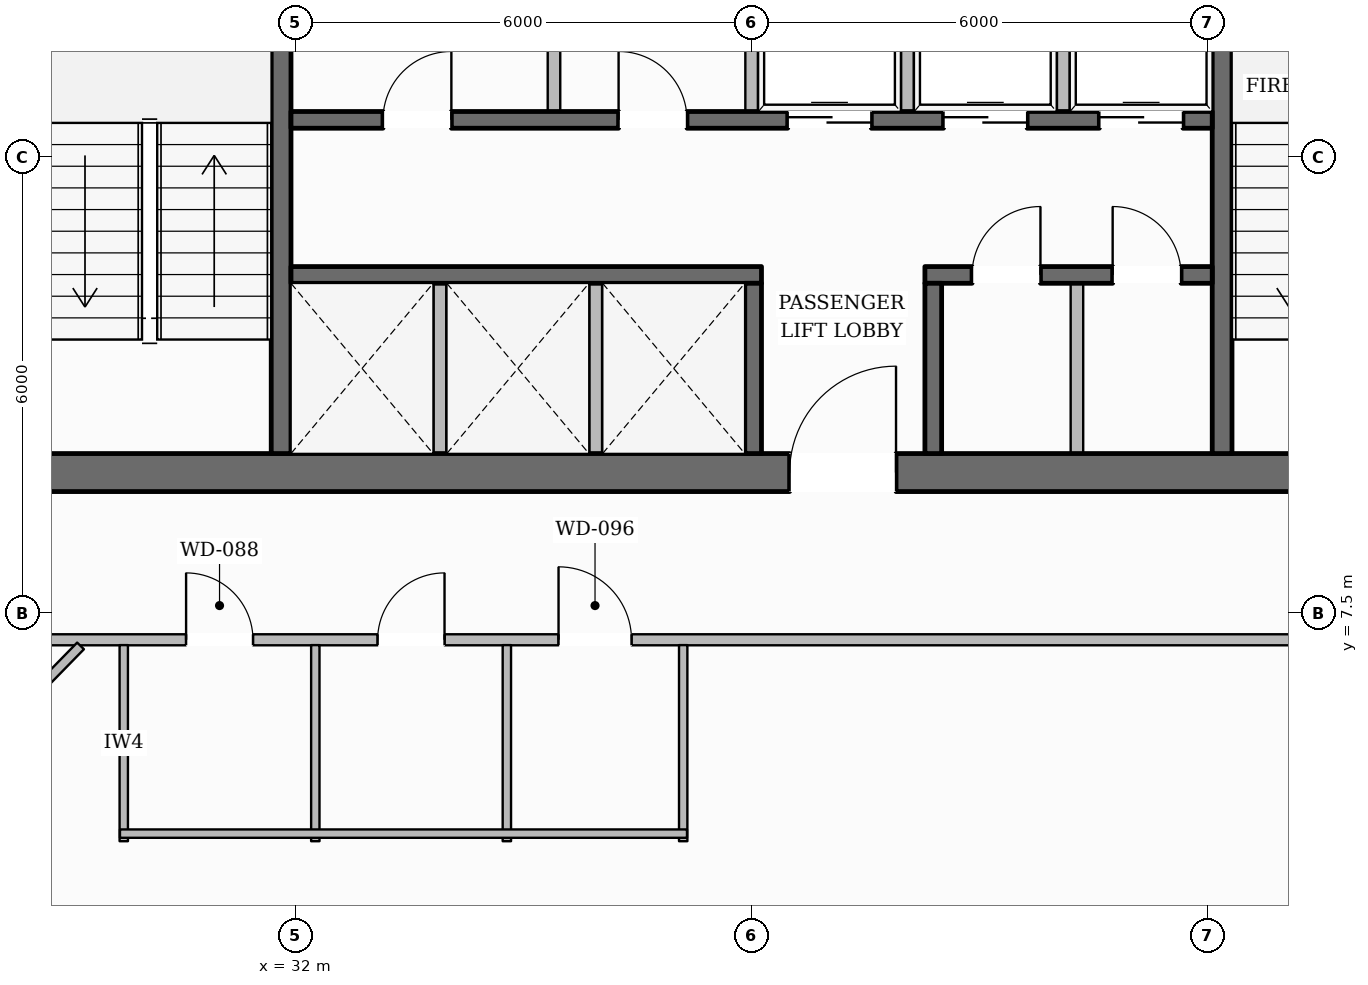
"""IFC4 building model, lengths in metres.
Left out: names, types, materials, properties, quantities, classifications, styles, units other than length and angle.
Written with IfcOpenShell. Run it as: python <this file> out.ifc"""

import sys

from ifc_helpers import new_model, si_unit, direction, frame, frame_2d, origin, place, context, subcontext, project, spatial, rectangle, extrude, element, fill, save


model = new_model("IFC4")
c1 = context("Model", 3, precision=1e-05, world=origin(), true_north=direction((0.0, 1.0)))
c2 = subcontext(c1, "Body", "Model", "MODEL_VIEW")
j1 = project(units=[si_unit("LENGTHUNIT", "METRE"), si_unit("PLANEANGLEUNIT", "RADIAN")], contexts=[c1])
p1 = place(None, origin())
s1 = spatial("IfcSite", under=j1, at=p1, CompositionType="ELEMENT")
p2 = place(p1, origin())
s2 = spatial("IfcBuilding", under=s1, at=p2, CompositionType="ELEMENT")
p3 = place(p2, frame((0.0, 0.0, 147.1)))
s3 = spatial("IfcBuildingStorey", under=s2, at=p3, CompositionType="ELEMENT", Elevation=147.1)
p4 = place(p3, frame((27.98, 9.35, 0.0), z_axis=(0.0, 0.0, 1.0), x_axis=(1.0, 0.0, 0.0)))
e1 = element("IfcWall", 1, at=p4, inside=s3, PredefinedType="SOLIDWALL", context=c2, shape_type="SweptSolid", body=[
    extrude(rectangle(XDim=20.04, YDim=0.5, at=frame_2d((10.02, 0.0))), origin(), (0.0, 0.0, 1.0), 3.6),
])
p5 = place(p4, frame((10.52, 0.0, 0.0)))
e2 = element("IfcOpeningElement", 2, at=p5, cuts=e1, PredefinedType="OPENING", context=c2, shape_type="SweptSolid", body=[
    extrude(rectangle(XDim=1.4, YDim=2.2, at=frame_2d((0.7, 1.1))), frame((0.0, 0.26, 0.0), z_axis=(0.0, -1.0, 0.0), x_axis=(1.0, 0.0, 0.0)), (0.0, 0.0, 1.0), 0.52),
])
p6 = place(p3, frame((31.81, 9.6, 0.0), z_axis=(0.0, 0.0, 1.0), x_axis=(0.0, 1.0, 0.0)))
e3 = element("IfcWall", 3, at=p6, inside=s3, PredefinedType="SHEAR", context=c2, shape_type="SweptSolid", body=[
    extrude(rectangle(XDim=13.0, YDim=0.26, at=frame_2d((6.5, 0.0))), origin(), (0.0, 0.0, 1.0), 3.6),
])
p7 = place(p6, frame((10.925, 0.0, 0.0)))
e4 = element("IfcOpeningElement", 4, at=p7, cuts=e3, PredefinedType="OPENING", context=c2, shape_type="SweptSolid", body=[
    extrude(rectangle(XDim=1.25, YDim=2.25, at=frame_2d((0.625, 1.125))), frame((0.0, 0.14, 0.0), z_axis=(0.0, -1.0, 0.0), x_axis=(1.0, 0.0, 0.0)), (0.0, 0.0, 1.0), 0.28),
])
p8 = place(p3, frame((44.19, 9.6, 0.0), z_axis=(0.0, 0.0, 1.0), x_axis=(0.0, 1.0, 0.0)))
e5 = element("IfcWall", 5, at=p8, inside=s3, PredefinedType="SHEAR", context=c2, shape_type="SweptSolid", body=[
    extrude(rectangle(XDim=13.0, YDim=0.26, at=frame_2d((6.5, 0.0))), origin(), (0.0, 0.0, 1.0), 3.6),
])
p9 = place(p8, frame((10.925, 0.0, 0.0)))
e6 = element("IfcOpeningElement", 6, at=p9, cuts=e5, PredefinedType="OPENING", context=c2, shape_type="SweptSolid", body=[
    extrude(rectangle(XDim=1.25, YDim=2.25, at=frame_2d((0.625, 1.125))), frame((0.0, 0.14, 0.0), z_axis=(0.0, -1.0, 0.0), x_axis=(1.0, 0.0, 0.0)), (0.0, 0.0, 1.0), 0.28),
])
p10 = place(p3, frame((31.94, 13.99, 0.0), z_axis=(0.0, 0.0, 1.0), x_axis=(1.0, 0.0, 0.0)))
e7 = element("IfcWall", 7, at=p10, inside=s3, PredefinedType="SOLIDWALL", context=c2, shape_type="SweptSolid", body=[
    extrude(rectangle(XDim=12.12, YDim=0.22, at=frame_2d((6.06, 0.0))), origin(), (0.0, 0.0, 1.0), 3.6),
])
p11 = place(p10, frame((1.21, 0.0, 0.0)))
e8 = element("IfcOpeningElement", 8, at=p11, cuts=e7, PredefinedType="OPENING", context=c2, shape_type="SweptSolid", body=[
    extrude(rectangle(XDim=0.9, YDim=2.1, at=frame_2d((0.45, 1.05))), frame((0.0, 0.12, 0.0), z_axis=(0.0, -1.0, 0.0), x_axis=(1.0, 0.0, 0.0)), (0.0, 0.0, 1.0), 0.24),
])
p12 = place(p10, frame((4.31, 0.0, 0.0)))
e9 = element("IfcOpeningElement", 9, at=p12, cuts=e7, PredefinedType="OPENING", context=c2, shape_type="SweptSolid", body=[
    extrude(rectangle(XDim=0.9, YDim=2.1, at=frame_2d((0.45, 1.05))), frame((0.0, 0.12, 0.0), z_axis=(0.0, -1.0, 0.0), x_axis=(1.0, 0.0, 0.0)), (0.0, 0.0, 1.0), 0.24),
])
p13 = place(p10, frame((6.535, 0.0, 0.0)))
e10 = element("IfcOpeningElement", 10, at=p13, cuts=e7, PredefinedType="OPENING", context=c2, shape_type="SweptSolid", body=[
    extrude(rectangle(XDim=1.1, YDim=2.2, at=frame_2d((0.55, 1.1))), frame((0.0, 0.12, 0.0), z_axis=(0.0, -1.0, 0.0), x_axis=(1.0, 0.0, 0.0)), (0.0, 0.0, 1.0), 0.24),
])
p14 = place(p10, frame((8.585, 0.0, 0.0)))
e11 = element("IfcOpeningElement", 11, at=p14, cuts=e7, PredefinedType="OPENING", context=c2, shape_type="SweptSolid", body=[
    extrude(rectangle(XDim=1.1, YDim=2.2, at=frame_2d((0.55, 1.1))), frame((0.0, 0.12, 0.0), z_axis=(0.0, -1.0, 0.0), x_axis=(1.0, 0.0, 0.0)), (0.0, 0.0, 1.0), 0.24),
])
p15 = place(p10, frame((10.635, 0.0, 0.0)))
e12 = element("IfcOpeningElement", 12, at=p15, cuts=e7, PredefinedType="OPENING", context=c2, shape_type="SweptSolid", body=[
    extrude(rectangle(XDim=1.1, YDim=2.2, at=frame_2d((0.55, 1.1))), frame((0.0, 0.12, 0.0), z_axis=(0.0, -1.0, 0.0), x_axis=(1.0, 0.0, 0.0)), (0.0, 0.0, 1.0), 0.24),
])
p16 = place(p3, frame((31.94, 11.95, 0.0), z_axis=(0.0, 0.0, 1.0), x_axis=(1.0, 0.0, 0.0)))
e13 = element("IfcWall", 13, at=p16, inside=s3, PredefinedType="SOLIDWALL", context=c2, shape_type="SweptSolid", body=[
    extrude(rectangle(XDim=6.19, YDim=0.22, at=frame_2d((3.095, 0.0))), origin(), (0.0, 0.0, 1.0), 3.6),
])
p17 = place(p3, frame((40.28, 11.95, 0.0), z_axis=(0.0, 0.0, 1.0), x_axis=(1.0, 0.0, 0.0)))
e14 = element("IfcWall", 14, at=p17, inside=s3, PredefinedType="SOLIDWALL", context=c2, shape_type="SweptSolid", body=[
    extrude(rectangle(XDim=3.78, YDim=0.22, at=frame_2d((1.89, 0.0))), origin(), (0.0, 0.0, 1.0), 3.6),
])
p18 = place(p17, frame((0.62, 0.0, 0.0)))
e15 = element("IfcOpeningElement", 15, at=p18, cuts=e14, PredefinedType="OPENING", context=c2, shape_type="SweptSolid", body=[
    extrude(rectangle(XDim=0.9, YDim=2.1, at=frame_2d((0.45, 1.05))), frame((0.0, 0.12, 0.0), z_axis=(0.0, -1.0, 0.0), x_axis=(1.0, 0.0, 0.0)), (0.0, 0.0, 1.0), 0.24),
])
p19 = place(p17, frame((2.47, 0.0, 0.0)))
e16 = element("IfcOpeningElement", 16, at=p19, cuts=e14, PredefinedType="OPENING", context=c2, shape_type="SweptSolid", body=[
    extrude(rectangle(XDim=0.9, YDim=2.1, at=frame_2d((0.45, 1.05))), frame((0.0, 0.12, 0.0), z_axis=(0.0, -1.0, 0.0), x_axis=(1.0, 0.0, 0.0)), (0.0, 0.0, 1.0), 0.24),
])
for number, where, z_axis, x_axis in (
    (17, (38.02, 9.6, 0.0), (0.0, 0.0, 1.0), (0.0, 1.0, 0.0)),
    (18, (40.39, 9.6, 0.0), (0.0, 0.0, 1.0), (0.0, 1.0, 0.0)),
):
    element("IfcWall", number, at=place(p3, frame(where, z_axis=z_axis, x_axis=x_axis)), inside=s3, PredefinedType="SOLIDWALL", context=c2, shape_type="SweptSolid", body=[
        extrude(rectangle(XDim=2.24, YDim=0.22, at=frame_2d((1.12, 0.0))), origin(), (0.0, 0.0, 1.0), 3.6),
    ])
p20 = place(p3, frame((13.248, 11.879, 0.0), z_axis=(0.0, 0.0, 1.0), x_axis=(0.503467320033, 0.864014269361, 0.0)))
e19 = element("IfcWall", 19, at=p20, inside=s3, PredefinedType="STANDARD", context=c2, shape_type="SweptSolid", body=[
    extrude(rectangle(XDim=38.396, YDim=0.38, at=frame_2d((19.198, 0.0))), origin(), (0.0, 0.0, 1.0), 3.059),
])
p21 = place(p20, frame((34.027, 0.0, 0.65)))
e20 = element("IfcOpeningElement", 20, at=p21, cuts=e19, PredefinedType="OPENING", context=c2, shape_type="SweptSolid", body=[
    extrude(rectangle(XDim=1.55, YDim=1.75, at=frame_2d((0.775, 0.875))), frame((0.0, 0.2, 0.0), z_axis=(0.0, -1.0, 0.0), x_axis=(1.0, 0.0, 0.0)), (0.0, 0.0, 1.0), 0.4),
])
p22 = place(p20, frame((27.786, 0.0, 0.65)))
e21 = element("IfcOpeningElement", 21, at=p22, cuts=e19, PredefinedType="OPENING", context=c2, shape_type="SweptSolid", body=[
    extrude(rectangle(XDim=1.55, YDim=1.75, at=frame_2d((0.775, 0.875))), frame((0.0, 0.2, 0.0), z_axis=(0.0, -1.0, 0.0), x_axis=(1.0, 0.0, 0.0)), (0.0, 0.0, 1.0), 0.4),
])
p23 = place(p20, frame((15.304, 0.0, 0.65)))
e22 = element("IfcOpeningElement", 22, at=p23, cuts=e19, PredefinedType="OPENING", context=c2, shape_type="SweptSolid", body=[
    extrude(rectangle(XDim=1.55, YDim=1.75, at=frame_2d((0.775, 0.875))), frame((0.0, 0.2, 0.0), z_axis=(0.0, -1.0, 0.0), x_axis=(1.0, 0.0, 0.0)), (0.0, 0.0, 1.0), 0.4),
])
p24 = place(p20, frame((9.063, 0.0, 0.65)))
e23 = element("IfcOpeningElement", 23, at=p24, cuts=e19, PredefinedType="OPENING", context=c2, shape_type="SweptSolid", body=[
    extrude(rectangle(XDim=1.55, YDim=1.75, at=frame_2d((0.775, 0.875))), frame((0.0, 0.2, 0.0), z_axis=(0.0, -1.0, 0.0), x_axis=(1.0, 0.0, 0.0)), (0.0, 0.0, 1.0), 0.4),
])
p25 = place(p20, frame((2.823, 0.0, 0.65)))
e24 = element("IfcOpeningElement", 24, at=p25, cuts=e19, PredefinedType="OPENING", context=c2, shape_type="SweptSolid", body=[
    extrude(rectangle(XDim=1.55, YDim=1.75, at=frame_2d((0.775, 0.875))), frame((0.0, 0.2, 0.0), z_axis=(0.0, -1.0, 0.0), x_axis=(1.0, 0.0, 0.0)), (0.0, 0.0, 1.0), 0.4),
])
p26 = place(p3, frame((43.264, 45.146, 0.0), z_axis=(0.0, 0.0, 1.0), x_axis=(0.496479799544, -0.868048275527, 0.0)))
e25 = element("IfcWall", 25, at=p26, inside=s3, PredefinedType="STANDARD", context=c2, shape_type="SweptSolid", body=[
    extrude(rectangle(XDim=37.869, YDim=0.38, at=frame_2d((18.934, 0.0))), origin(), (0.0, 0.0, 1.0), 3.059),
])
p27 = place(p26, frame((33.541, 0.0, 0.65)))
e26 = element("IfcOpeningElement", 26, at=p27, cuts=e25, PredefinedType="OPENING", context=c2, shape_type="SweptSolid", body=[
    extrude(rectangle(XDim=1.55, YDim=1.75, at=frame_2d((0.775, 0.875))), frame((0.0, 0.2, 0.0), z_axis=(0.0, -1.0, 0.0), x_axis=(1.0, 0.0, 0.0)), (0.0, 0.0, 1.0), 0.4),
])
p28 = place(p26, frame((27.389, 0.0, 0.65)))
e27 = element("IfcOpeningElement", 27, at=p28, cuts=e25, PredefinedType="OPENING", context=c2, shape_type="SweptSolid", body=[
    extrude(rectangle(XDim=1.55, YDim=1.75, at=frame_2d((0.775, 0.875))), frame((0.0, 0.2, 0.0), z_axis=(0.0, -1.0, 0.0), x_axis=(1.0, 0.0, 0.0)), (0.0, 0.0, 1.0), 0.4),
])
p29 = place(p26, frame((15.085, 0.0, 0.65)))
e28 = element("IfcOpeningElement", 28, at=p29, cuts=e25, PredefinedType="OPENING", context=c2, shape_type="SweptSolid", body=[
    extrude(rectangle(XDim=1.55, YDim=1.75, at=frame_2d((0.775, 0.875))), frame((0.0, 0.2, 0.0), z_axis=(0.0, -1.0, 0.0), x_axis=(1.0, 0.0, 0.0)), (0.0, 0.0, 1.0), 0.4),
])
p30 = place(p26, frame((8.934, 0.0, 0.65)))
e29 = element("IfcOpeningElement", 29, at=p30, cuts=e25, PredefinedType="OPENING", context=c2, shape_type="SweptSolid", body=[
    extrude(rectangle(XDim=1.55, YDim=1.75, at=frame_2d((0.775, 0.875))), frame((0.0, 0.2, 0.0), z_axis=(0.0, -1.0, 0.0), x_axis=(1.0, 0.0, 0.0)), (0.0, 0.0, 1.0), 0.4),
])
p31 = place(p26, frame((2.782, 0.0, 0.65)))
e30 = element("IfcOpeningElement", 30, at=p31, cuts=e25, PredefinedType="OPENING", context=c2, shape_type="SweptSolid", body=[
    extrude(rectangle(XDim=1.55, YDim=1.75, at=frame_2d((0.775, 0.875))), frame((0.0, 0.2, 0.0), z_axis=(0.0, -1.0, 0.0), x_axis=(1.0, 0.0, 0.0)), (0.0, 0.0, 1.0), 0.4),
])
for number, where, z_axis, x_axis in (
    (31, (33.9, 9.55, 0.0), (0.0, 0.0, 1.0), (0.0, 1.0, 0.0)),
    (32, (35.95, 9.55, 0.0), (0.0, 0.0, 1.0), (0.0, 1.0, 0.0)),
):
    element("IfcWall", number, at=place(p3, frame(where, z_axis=z_axis, x_axis=x_axis)), inside=s3, PredefinedType="PARTITIONING", context=c2, shape_type="SweptSolid", body=[
        extrude(rectangle(XDim=2.29, YDim=0.165, at=frame_2d((1.145, 0.0))), origin(), (0.0, 0.0, 1.0), 3.6),
    ])
for number, where, z_axis, x_axis in (
    (33, (38.0, 14.1, 0.0), (0.0, 0.0, 1.0), (0.0, 1.0, 0.0)),
    (34, (35.4, 14.1, 0.0), (0.0, 0.0, 1.0), (0.0, 1.0, 0.0)),
    (35, (40.05, 14.1, 0.0), (0.0, 0.0, 1.0), (0.0, 1.0, 0.0)),
    (36, (42.1, 14.1, 0.0), (0.0, 0.0, 1.0), (0.0, 1.0, 0.0)),
):
    element("IfcWall", number, at=place(p3, frame(where, z_axis=z_axis, x_axis=x_axis)), inside=s3, PredefinedType="PARTITIONING", context=c2, shape_type="SweptSolid", body=[
        extrude(rectangle(XDim=2.24, YDim=0.165, at=frame_2d((1.12, 0.0))), origin(), (0.0, 0.0, 1.0), 3.6),
    ])
p32 = place(p3, frame((42.28, 9.55, 0.0), z_axis=(0.0, 0.0, 1.0), x_axis=(0.0, 1.0, 0.0)))
e37 = element("IfcWall", 37, at=p32, inside=s3, PredefinedType="PARTITIONING", context=c2, shape_type="SweptSolid", body=[
    extrude(rectangle(XDim=2.29, YDim=0.165, at=frame_2d((1.145, 0.0))), origin(), (0.0, 0.0, 1.0), 3.6),
])
p33 = place(p3, frame((26.03, 7.15, 0.0), z_axis=(0.0, 0.0, 1.0), x_axis=(1.0, 0.0, 0.0)))
e38 = element("IfcWall", 38, at=p33, inside=s3, PredefinedType="PARTITIONING", context=c2, shape_type="SweptSolid", body=[
    extrude(rectangle(XDim=23.94, YDim=0.145, at=frame_2d((11.97, 0.0))), origin(), (0.0, 0.0, 1.0), 3.6),
])
p34 = place(p33, frame((4.53, 0.0, 0.0)))
e39 = element("IfcOpeningElement", 39, at=p34, cuts=e38, PredefinedType="OPENING", context=c2, shape_type="SweptSolid", body=[
    extrude(rectangle(XDim=0.88, YDim=2.1, at=frame_2d((0.44, 1.05))), frame((0.0, 0.083, 0.0), z_axis=(0.0, -1.0, 0.0), x_axis=(1.0, 0.0, 0.0)), (0.0, 0.0, 1.0), 0.165),
])
p35 = place(p33, frame((7.05, 0.0, 0.0)))
e40 = element("IfcOpeningElement", 40, at=p35, cuts=e38, PredefinedType="OPENING", context=c2, shape_type="SweptSolid", body=[
    extrude(rectangle(XDim=0.88, YDim=2.1, at=frame_2d((0.44, 1.05))), frame((0.0, 0.083, 0.0), z_axis=(0.0, -1.0, 0.0), x_axis=(1.0, 0.0, 0.0)), (0.0, 0.0, 1.0), 0.165),
])
p36 = place(p33, frame((9.43, 0.0, 0.0)))
e41 = element("IfcOpeningElement", 41, at=p36, cuts=e38, PredefinedType="OPENING", context=c2, shape_type="SweptSolid", body=[
    extrude(rectangle(XDim=0.96, YDim=2.1, at=frame_2d((0.48, 1.05))), frame((0.0, 0.083, 0.0), z_axis=(0.0, -1.0, 0.0), x_axis=(1.0, 0.0, 0.0)), (0.0, 0.0, 1.0), 0.165),
])
for number, where, z_axis, x_axis in (
    (42, (29.74, 4.5, 0.0), (0.0, 0.0, 1.0), (0.0, 1.0, 0.0)),
    (43, (32.26, 4.5, 0.0), (0.0, 0.0, 1.0), (0.0, 1.0, 0.0)),
    (44, (34.78, 4.5, 0.0), (0.0, 0.0, 1.0), (0.0, 1.0, 0.0)),
    (45, (37.1, 4.5, 0.0), (0.0, 0.0, 1.0), (0.0, 1.0, 0.0)),
):
    element("IfcWall", number, at=place(p3, frame(where, z_axis=z_axis, x_axis=x_axis)), inside=s3, PredefinedType="PLUMBINGWALL", context=c2, shape_type="SweptSolid", body=[
        extrude(rectangle(XDim=2.58, YDim=0.11, at=frame_2d((1.29, 0.0))), origin(), (0.0, 0.0, 1.0), 3.6),
    ])
p37 = place(p3, frame((29.69, 4.6, 0.0), z_axis=(0.0, 0.0, 1.0), x_axis=(1.0, 0.0, 0.0)))
e46 = element("IfcWall", 46, at=p37, inside=s3, PredefinedType="PLUMBINGWALL", context=c2, shape_type="SweptSolid", body=[
    extrude(rectangle(XDim=7.46, YDim=0.11, at=frame_2d((3.73, 0.0))), origin(), (0.0, 0.0, 1.0), 3.6),
])
p38 = place(p3, frame((29.171, 7.07, 0.0), z_axis=(0.0, 0.0, 1.0), x_axis=(-0.69905826228, -0.715064714511, 0.0)))
e47 = element("IfcWall", 47, at=p38, inside=s3, PredefinedType="PARTITIONING", context=c2, shape_type="SweptSolid", body=[
    extrude(rectangle(XDim=5.186, YDim=0.125, at=frame_2d((2.593, 0.0))), origin(), (0.0, 0.0, 1.0), 3.6),
])
p39 = place(p5, origin())
e48 = element("IfcDoor", 48, at=p39, inside=s3, OperationType="SINGLE_SWING_RIGHT", PredefinedType="DOOR", context=c2, shape_type="SweptSolid", body=[
    extrude(rectangle(XDim=1.4, YDim=2.2, at=frame_2d((0.7, 1.1))), frame((0.0, 0.025, 0.0), z_axis=(0.0, -1.0, 0.0), x_axis=(1.0, 0.0, 0.0)), (0.0, 0.0, 1.0), 0.05),
])
fill(e2, e48)
p40 = place(p11, origin())
e49 = element("IfcDoor", 49, at=p40, inside=s3, OperationType="SINGLE_SWING_RIGHT", PredefinedType="DOOR", context=c2, shape_type="SweptSolid", body=[
    extrude(rectangle(XDim=0.9, YDim=2.1, at=frame_2d((0.45, 1.05))), frame((0.0, 0.025, 0.0), z_axis=(0.0, -1.0, 0.0), x_axis=(1.0, 0.0, 0.0)), (0.0, 0.0, 1.0), 0.05),
])
fill(e8, e49)
p41 = place(p12, origin())
e50 = element("IfcDoor", 50, at=p41, inside=s3, OperationType="SINGLE_SWING_LEFT", PredefinedType="DOOR", context=c2, shape_type="SweptSolid", body=[
    extrude(rectangle(XDim=0.9, YDim=2.1, at=frame_2d((0.45, 1.05))), frame((0.0, 0.025, 0.0), z_axis=(0.0, -1.0, 0.0), x_axis=(1.0, 0.0, 0.0)), (0.0, 0.0, 1.0), 0.05),
])
fill(e9, e50)
p42 = place(p13, origin())
e51 = element("IfcDoor", 51, at=p42, inside=s3, OperationType="DOUBLE_DOOR_SLIDING", PredefinedType="DOOR", context=c2, shape_type="SweptSolid", body=[
    extrude(rectangle(XDim=1.1, YDim=2.2, at=frame_2d((0.55, 1.1))), frame((0.0, 0.025, 0.0), z_axis=(0.0, -1.0, 0.0), x_axis=(1.0, 0.0, 0.0)), (0.0, 0.0, 1.0), 0.05),
])
fill(e10, e51)
p43 = place(p14, origin())
e52 = element("IfcDoor", 52, at=p43, inside=s3, OperationType="DOUBLE_DOOR_SLIDING", PredefinedType="DOOR", context=c2, shape_type="SweptSolid", body=[
    extrude(rectangle(XDim=1.1, YDim=2.2, at=frame_2d((0.55, 1.1))), frame((0.0, 0.025, 0.0), z_axis=(0.0, -1.0, 0.0), x_axis=(1.0, 0.0, 0.0)), (0.0, 0.0, 1.0), 0.05),
])
fill(e11, e52)
p44 = place(p15, origin())
e53 = element("IfcDoor", 53, at=p44, inside=s3, OperationType="DOUBLE_DOOR_SLIDING", PredefinedType="DOOR", context=c2, shape_type="SweptSolid", body=[
    extrude(rectangle(XDim=1.1, YDim=2.2, at=frame_2d((0.55, 1.1))), frame((0.0, 0.025, 0.0), z_axis=(0.0, -1.0, 0.0), x_axis=(1.0, 0.0, 0.0)), (0.0, 0.0, 1.0), 0.05),
])
fill(e12, e53)
p45 = place(p18, origin())
e54 = element("IfcDoor", 54, at=p45, inside=s3, OperationType="SINGLE_SWING_RIGHT", PredefinedType="DOOR", context=c2, shape_type="SweptSolid", body=[
    extrude(rectangle(XDim=0.9, YDim=2.1, at=frame_2d((0.45, 1.05))), frame((0.0, 0.025, 0.0), z_axis=(0.0, -1.0, 0.0), x_axis=(1.0, 0.0, 0.0)), (0.0, 0.0, 1.0), 0.05),
])
fill(e15, e54)
p46 = place(p19, origin())
e55 = element("IfcDoor", 55, at=p46, inside=s3, OperationType="SINGLE_SWING_LEFT", PredefinedType="DOOR", context=c2, shape_type="SweptSolid", body=[
    extrude(rectangle(XDim=0.9, YDim=2.1, at=frame_2d((0.45, 1.05))), frame((0.0, 0.025, 0.0), z_axis=(0.0, -1.0, 0.0), x_axis=(1.0, 0.0, 0.0)), (0.0, 0.0, 1.0), 0.05),
])
fill(e16, e55)
p47 = place(p34, origin())
e56 = element("IfcDoor", 56, at=p47, inside=s3, OperationType="SINGLE_SWING_LEFT", PredefinedType="DOOR", context=c2, shape_type="SweptSolid", body=[
    extrude(rectangle(XDim=0.88, YDim=2.1, at=frame_2d((0.44, 1.05))), frame((0.0, 0.025, 0.0), z_axis=(0.0, -1.0, 0.0), x_axis=(1.0, 0.0, 0.0)), (0.0, 0.0, 1.0), 0.05),
])
fill(e39, e56)
p48 = place(p35, origin())
e57 = element("IfcDoor", 57, at=p48, inside=s3, OperationType="SINGLE_SWING_RIGHT", PredefinedType="DOOR", context=c2, shape_type="SweptSolid", body=[
    extrude(rectangle(XDim=0.88, YDim=2.1, at=frame_2d((0.44, 1.05))), frame((0.0, 0.025, 0.0), z_axis=(0.0, -1.0, 0.0), x_axis=(1.0, 0.0, 0.0)), (0.0, 0.0, 1.0), 0.05),
])
fill(e40, e57)
p49 = place(p36, origin())
e58 = element("IfcDoor", 58, at=p49, inside=s3, OperationType="SINGLE_SWING_LEFT", PredefinedType="DOOR", context=c2, shape_type="SweptSolid", body=[
    extrude(rectangle(XDim=0.96, YDim=2.1, at=frame_2d((0.48, 1.05))), frame((0.0, 0.025, 0.0), z_axis=(0.0, -1.0, 0.0), x_axis=(1.0, 0.0, 0.0)), (0.0, 0.0, 1.0), 0.05),
])
fill(e41, e58)
save(model, sys.argv[1])
